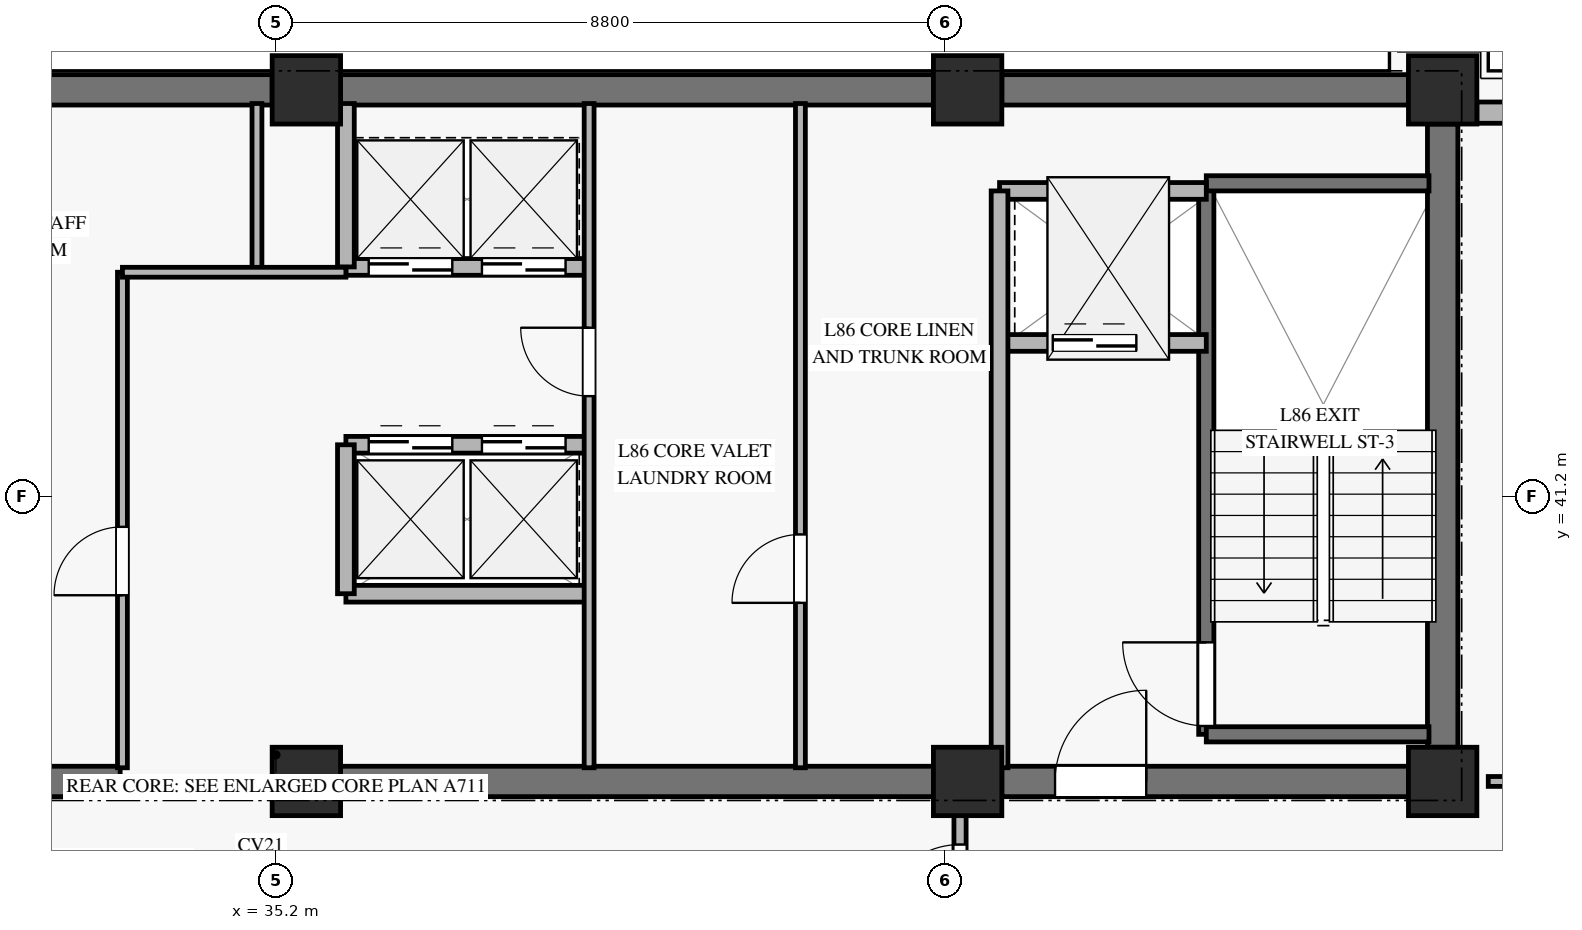
"""IFC4 building model, lengths in metres.
Left out: names, types, materials, properties, quantities, classifications, styles, units other than length and angle.
Written with IfcOpenShell. Run it as: python <this file> out.ifc"""

import sys

from ifc_helpers import new_model, si_unit, direction, frame, frame_2d, origin, origin_2d, place, context, subcontext, project, spatial, rectangle, extrude, source, transform, mapped, element, fill, save


model = new_model("IFC4")
c1 = context("Model", 3, precision=1e-05, world=origin(), true_north=direction((0.0, 1.0)))
c2 = subcontext(c1, "Body", "Model", "MODEL_VIEW")
j1 = project(units=[si_unit("LENGTHUNIT", "METRE"), si_unit("PLANEANGLEUNIT", "RADIAN")], contexts=[c1])
p1 = place(None, origin())
s1 = spatial("IfcSite", under=j1, at=p1, CompositionType="ELEMENT")
p2 = place(p1, origin())
s2 = spatial("IfcBuilding", under=s1, at=p2, CompositionType="ELEMENT")
p3 = place(p2, frame((0.0, 0.0, 332.3)))
s3 = spatial("IfcBuildingStorey", under=s2, at=p3, CompositionType="ELEMENT", Elevation=332.3)
m1 = source(origin(), c2, "Body", "SweptSolid", [
    extrude(rectangle(XDim=0.9, YDim=0.9, at=origin_2d()), origin(), (0.0, 0.0, 1.0), 3.185),
])
for number, where, z_axis, x_axis in (
    (1, (35.6, 37.45, 0.0), (0.0, 0.0, 1.0), (1.0, 0.0, 0.0)),
    (2, (35.6, 46.55, 0.0), (0.0, 0.0, 1.0), (1.0, 0.0, 0.0)),
    (3, (44.3, 37.45, 0.0), (0.0, 0.0, 1.0), (1.0, 0.0, 0.0)),
    (4, (44.3, 46.55, 0.0), (0.0, 0.0, 1.0), (1.0, 0.0, 0.0)),
    (5, (50.55, 37.45, 0.0), (0.0, 0.0, 1.0), (1.0, 0.0, 0.0)),
    (6, (50.55, 46.55, 0.0), (0.0, 0.0, 1.0), (1.0, 0.0, 0.0)),
):
    element("IfcColumn", number, at=place(p3, frame(where, z_axis=z_axis, x_axis=x_axis)), inside=s3, PredefinedType="PILASTER", context=c2, shape_type="MappedRepresentation", body=[
        mapped(m1, transform((0.0, 0.0, 0.0), x_axis=(1.0, 0.0, 0.0), y_axis=(0.0, 1.0, 0.0), z_axis=(0.0, 0.0, 1.0), scale=1.0)),
    ])
p4 = place(p3, frame((31.25, 46.55, 0.0), z_axis=(0.0, 0.0, 1.0), x_axis=(1.0, 0.0, 0.0)))
e7 = element("IfcWall", 7, at=p4, inside=s3, PredefinedType="SHEAR", context=c2, shape_type="SweptSolid", body=[
    extrude(rectangle(XDim=3.9, YDim=0.4, at=frame_2d((1.95, 0.0))), origin(), (0.0, 0.0, 1.0), 3.185),
])
p5 = place(p3, frame((36.05, 46.55, 0.0), z_axis=(0.0, 0.0, 1.0), x_axis=(1.0, 0.0, 0.0)))
e8 = element("IfcWall", 8, at=p5, inside=s3, PredefinedType="SHEAR", context=c2, shape_type="SweptSolid", body=[
    extrude(rectangle(XDim=7.8, YDim=0.4, at=frame_2d((3.9, 0.0))), origin(), (0.0, 0.0, 1.0), 3.185),
])
p6 = place(p3, frame((44.75, 46.55, 0.0), z_axis=(0.0, 0.0, 1.0), x_axis=(1.0, 0.0, 0.0)))
e9 = element("IfcWall", 9, at=p6, inside=s3, PredefinedType="SHEAR", context=c2, shape_type="SweptSolid", body=[
    extrude(rectangle(XDim=5.35, YDim=0.4, at=frame_2d((2.675, 0.0))), origin(), (0.0, 0.0, 1.0), 3.185),
])
p7 = place(p3, frame((31.25, 37.45, 0.0), z_axis=(0.0, 0.0, 1.0), x_axis=(1.0, 0.0, 0.0)))
e10 = element("IfcWall", 10, at=p7, inside=s3, PredefinedType="SHEAR", context=c2, shape_type="SweptSolid", body=[
    extrude(rectangle(XDim=1.9, YDim=0.4, at=frame_2d((0.95, 0.0))), origin(), (0.0, 0.0, 1.0), 3.185),
])
p8 = place(p3, frame((36.05, 37.45, 0.0), z_axis=(0.0, 0.0, 1.0), x_axis=(1.0, 0.0, 0.0)))
e11 = element("IfcWall", 11, at=p8, inside=s3, PredefinedType="SHEAR", context=c2, shape_type="SweptSolid", body=[
    extrude(rectangle(XDim=7.8, YDim=0.4, at=frame_2d((3.9, 0.0))), origin(), (0.0, 0.0, 1.0), 3.185),
])
p9 = place(p3, frame((44.75, 37.45, 0.0), z_axis=(0.0, 0.0, 1.0), x_axis=(1.0, 0.0, 0.0)))
e12 = element("IfcWall", 12, at=p9, inside=s3, PredefinedType="SHEAR", context=c2, shape_type="SweptSolid", body=[
    extrude(rectangle(XDim=5.35, YDim=0.4, at=frame_2d((2.675, 0.0))), origin(), (0.0, 0.0, 1.0), 3.185),
])
p10 = place(p9, frame((0.7, 0.0, 0.0)))
e13 = element("IfcOpeningElement", 13, at=p10, cuts=e12, PredefinedType="OPENING", context=c2, shape_type="SweptSolid", body=[
    extrude(rectangle(XDim=1.2, YDim=2.15, at=frame_2d((0.6, 1.075))), frame((0.0, 0.21, 0.0), z_axis=(0.0, -1.0, 0.0), x_axis=(1.0, 0.0, 0.0)), (0.0, 0.0, 1.0), 0.42),
])
p11 = place(p3, frame((50.55, 37.9, 0.0), z_axis=(0.0, 0.0, 1.0), x_axis=(0.0, 1.0, 0.0)))
e14 = element("IfcWall", 14, at=p11, inside=s3, PredefinedType="SHEAR", context=c2, shape_type="SweptSolid", body=[
    extrude(rectangle(XDim=8.2, YDim=0.4, at=frame_2d((4.1, 0.0))), origin(), (0.0, 0.0, 1.0), 3.185),
])
p12 = place(p3, frame((51.0, 46.25, 0.0), z_axis=(0.0, 0.0, 1.0), x_axis=(1.0, 0.0, 0.0)))
e15 = element("IfcWall", 15, at=p12, inside=s3, PredefinedType="SOLIDWALL", context=c2, shape_type="SweptSolid", body=[
    extrude(rectangle(XDim=5.639, YDim=0.28, at=frame_2d((2.819, 0.0))), origin(), (0.0, 0.0, 1.0), 2.815),
])
p13 = place(p12, frame((2.02, 0.0, 0.45)))
e16 = element("IfcOpeningElement", 16, at=p13, cuts=e15, PredefinedType="OPENING", context=c2, shape_type="SweptSolid", body=[
    extrude(rectangle(XDim=1.6, YDim=2.0, at=frame_2d((0.8, 1.0))), frame((0.0, 0.15, 0.0), z_axis=(0.0, -1.0, 0.0), x_axis=(1.0, 0.0, 0.0)), (0.0, 0.0, 1.0), 0.3),
])
p14 = place(p3, frame((47.44, 38.07, 0.0), z_axis=(0.0, 0.0, 1.0), x_axis=(0.0, 1.0, 0.0)))
e17 = element("IfcWall", 17, at=p14, inside=s3, PredefinedType="SOLIDWALL", context=c2, shape_type="SweptSolid", body=[
    extrude(rectangle(XDim=7.25, YDim=0.2, at=frame_2d((3.625, 0.0))), origin(), (0.0, 0.0, 1.0), 3.4),
])
p15 = place(p14, frame((0.11, 0.0, 0.0)))
e18 = element("IfcOpeningElement", 18, at=p15, cuts=e17, PredefinedType="OPENING", context=c2, shape_type="SweptSolid", body=[
    extrude(rectangle(XDim=1.1, YDim=2.15, at=frame_2d((0.55, 1.075))), frame((0.0, 0.11, 0.0), z_axis=(0.0, -1.0, 0.0), x_axis=(1.0, 0.0, 0.0)), (0.0, 0.0, 1.0), 0.22),
])
for number, where, z_axis, x_axis in (
    (19, (47.44, 45.32, 0.0), (0.0, 0.0, 1.0), (1.0, 0.0, 0.0)),
    (20, (47.44, 38.07, 0.0), (0.0, 0.0, 1.0), (1.0, 0.0, 0.0)),
):
    element("IfcWall", number, at=place(p3, frame(where, z_axis=z_axis, x_axis=x_axis)), inside=s3, PredefinedType="SOLIDWALL", context=c2, shape_type="SweptSolid", body=[
        extrude(rectangle(XDim=2.93, YDim=0.2, at=frame_2d((1.465, 0.0))), origin(), (0.0, 0.0, 1.0), 3.4),
    ])
p16 = place(p3, frame((44.72, 43.22, 0.0), z_axis=(0.0, 0.0, 1.0), x_axis=(1.0, 0.0, 0.0)))
e21 = element("IfcWall", 21, at=p16, inside=s3, PredefinedType="SOLIDWALL", context=c2, shape_type="SweptSolid", body=[
    extrude(rectangle(XDim=2.72, YDim=0.22, at=frame_2d((1.36, 0.0))), origin(), (0.0, 0.0, 1.0), 3.185),
])
p17 = place(p16, frame((0.7, 0.0, 0.0)))
e22 = element("IfcOpeningElement", 22, at=p17, cuts=e21, PredefinedType="OPENING", context=c2, shape_type="SweptSolid", body=[
    extrude(rectangle(XDim=1.1, YDim=2.2, at=frame_2d((0.55, 1.1))), frame((0.0, 0.12, 0.0), z_axis=(0.0, -1.0, 0.0), x_axis=(1.0, 0.0, 0.0)), (0.0, 0.0, 1.0), 0.24),
])
p18 = place(p3, frame((44.72, 45.22, 0.0), z_axis=(0.0, 0.0, 1.0), x_axis=(1.0, 0.0, 0.0)))
e23 = element("IfcWall", 23, at=p18, inside=s3, PredefinedType="SOLIDWALL", context=c2, shape_type="SweptSolid", body=[
    extrude(rectangle(XDim=2.72, YDim=0.22, at=frame_2d((1.36, 0.0))), origin(), (0.0, 0.0, 1.0), 3.185),
])
p19 = place(p3, frame((44.72, 37.63, 0.0), z_axis=(0.0, 0.0, 1.0), x_axis=(0.0, 1.0, 0.0)))
e24 = element("IfcWall", 24, at=p19, inside=s3, PredefinedType="SOLIDWALL", context=c2, shape_type="SweptSolid", body=[
    extrude(rectangle(XDim=7.59, YDim=0.22, at=frame_2d((3.795, 0.0))), origin(), (0.0, 0.0, 1.0), 3.185),
])
p20 = place(p3, frame((36.12, 44.22, 0.0), z_axis=(0.0, 0.0, 1.0), x_axis=(1.0, 0.0, 0.0)))
e25 = element("IfcWall", 25, at=p20, inside=s3, PredefinedType="SOLIDWALL", context=c2, shape_type="SweptSolid", body=[
    extrude(rectangle(XDim=3.2, YDim=0.22, at=frame_2d((1.6, 0.0))), origin(), (0.0, 0.0, 1.0), 3.185),
])
p21 = place(p20, frame((0.3, 0.0, 0.0)))
e26 = element("IfcOpeningElement", 26, at=p21, cuts=e25, PredefinedType="OPENING", context=c2, shape_type="SweptSolid", body=[
    extrude(rectangle(XDim=1.1, YDim=2.2, at=frame_2d((0.55, 1.1))), frame((0.0, 0.12, 0.0), z_axis=(0.0, -1.0, 0.0), x_axis=(1.0, 0.0, 0.0)), (0.0, 0.0, 1.0), 0.24),
])
p22 = place(p20, frame((1.79, 0.0, 0.0)))
e27 = element("IfcOpeningElement", 27, at=p22, cuts=e25, PredefinedType="OPENING", context=c2, shape_type="SweptSolid", body=[
    extrude(rectangle(XDim=1.1, YDim=2.2, at=frame_2d((0.55, 1.1))), frame((0.0, 0.12, 0.0), z_axis=(0.0, -1.0, 0.0), x_axis=(1.0, 0.0, 0.0)), (0.0, 0.0, 1.0), 0.24),
])
p23 = place(p3, frame((36.12, 41.88, 0.0), z_axis=(0.0, 0.0, 1.0), x_axis=(1.0, 0.0, 0.0)))
e28 = element("IfcWall", 28, at=p23, inside=s3, PredefinedType="SOLIDWALL", context=c2, shape_type="SweptSolid", body=[
    extrude(rectangle(XDim=3.2, YDim=0.22, at=frame_2d((1.6, 0.0))), origin(), (0.0, 0.0, 1.0), 3.185),
])
p24 = place(p23, frame((0.3, 0.0, 0.0)))
e29 = element("IfcOpeningElement", 29, at=p24, cuts=e28, PredefinedType="OPENING", context=c2, shape_type="SweptSolid", body=[
    extrude(rectangle(XDim=1.1, YDim=2.2, at=frame_2d((0.55, 1.1))), frame((0.0, 0.12, 0.0), z_axis=(0.0, -1.0, 0.0), x_axis=(1.0, 0.0, 0.0)), (0.0, 0.0, 1.0), 0.24),
])
p25 = place(p23, frame((1.79, 0.0, 0.0)))
e30 = element("IfcOpeningElement", 30, at=p25, cuts=e28, PredefinedType="OPENING", context=c2, shape_type="SweptSolid", body=[
    extrude(rectangle(XDim=1.1, YDim=2.2, at=frame_2d((0.55, 1.1))), frame((0.0, 0.12, 0.0), z_axis=(0.0, -1.0, 0.0), x_axis=(1.0, 0.0, 0.0)), (0.0, 0.0, 1.0), 0.24),
])
p26 = place(p3, frame((36.12, 39.92, 0.0), z_axis=(0.0, 0.0, 1.0), x_axis=(1.0, 0.0, 0.0)))
e31 = element("IfcWall", 31, at=p26, inside=s3, PredefinedType="SOLIDWALL", context=c2, shape_type="SweptSolid", body=[
    extrude(rectangle(XDim=3.2, YDim=0.22, at=frame_2d((1.6, 0.0))), origin(), (0.0, 0.0, 1.0), 3.185),
])
p27 = place(p3, frame((36.12, 39.92, 0.0), z_axis=(0.0, 0.0, 1.0), x_axis=(0.0, 1.0, 0.0)))
e32 = element("IfcWall", 32, at=p27, inside=s3, PredefinedType="SOLIDWALL", context=c2, shape_type="SweptSolid", body=[
    extrude(rectangle(XDim=1.96, YDim=0.22, at=frame_2d((0.98, 0.0))), origin(), (0.0, 0.0, 1.0), 3.185),
])
p28 = place(p3, frame((36.12, 44.22, 0.0), z_axis=(0.0, 0.0, 1.0), x_axis=(0.0, 1.0, 0.0)))
e33 = element("IfcWall", 33, at=p28, inside=s3, PredefinedType="SOLIDWALL", context=c2, shape_type="SweptSolid", body=[
    extrude(rectangle(XDim=2.15, YDim=0.22, at=frame_2d((1.075, 0.0))), origin(), (0.0, 0.0, 1.0), 3.185),
])
p29 = place(p3, frame((33.18, 37.63, 0.0), z_axis=(0.0, 0.0, 1.0), x_axis=(0.0, 1.0, 0.0)))
e34 = element("IfcWall", 34, at=p29, inside=s3, PredefinedType="PARTITIONING", context=c2, shape_type="SweptSolid", body=[
    extrude(rectangle(XDim=6.52, YDim=0.13, at=frame_2d((3.26, 0.0))), origin(), (0.0, 0.0, 1.0), 2.27),
])
p30 = place(p29, frame((2.27, 0.0, 0.0)))
e35 = element("IfcOpeningElement", 35, at=p30, cuts=e34, PredefinedType="OPENING", context=c2, shape_type="SweptSolid", body=[
    extrude(rectangle(XDim=0.9, YDim=2.1, at=frame_2d((0.45, 1.05))), frame((0.0, 0.075, 0.0), z_axis=(0.0, -1.0, 0.0), x_axis=(1.0, 0.0, 0.0)), (0.0, 0.0, 1.0), 0.15),
])
p31 = place(p3, frame((34.95, 44.15, 0.0), z_axis=(0.0, 0.0, 1.0), x_axis=(0.0, 1.0, 0.0)))
e36 = element("IfcWall", 36, at=p31, inside=s3, PredefinedType="PARTITIONING", context=c2, shape_type="SweptSolid", body=[
    extrude(rectangle(XDim=2.22, YDim=0.13, at=frame_2d((1.11, 0.0))), origin(), (0.0, 0.0, 1.0), 3.185),
])
p32 = place(p3, frame((33.18, 44.15, 0.0), z_axis=(0.0, 0.0, 1.0), x_axis=(1.0, 0.0, 0.0)))
e37 = element("IfcWall", 37, at=p32, inside=s3, PredefinedType="PARTITIONING", context=c2, shape_type="SweptSolid", body=[
    extrude(rectangle(XDim=2.94, YDim=0.13, at=frame_2d((1.47, 0.0))), origin(), (0.0, 0.0, 1.0), 2.47),
])
p33 = place(p3, frame((39.32, 37.63, 0.0), z_axis=(0.0, 0.0, 1.0), x_axis=(0.0, 1.0, 0.0)))
e38 = element("IfcWall", 38, at=p33, inside=s3, PredefinedType="PARTITIONING", context=c2, shape_type="SweptSolid", body=[
    extrude(rectangle(XDim=8.74, YDim=0.13, at=frame_2d((4.37, 0.0))), origin(), (0.0, 0.0, 1.0), 3.185),
])
p34 = place(p33, frame((4.89, 0.0, 0.0)))
e39 = element("IfcOpeningElement", 39, at=p34, cuts=e38, PredefinedType="OPENING", context=c2, shape_type="SweptSolid", body=[
    extrude(rectangle(XDim=0.9, YDim=2.1, at=frame_2d((0.45, 1.05))), frame((0.0, 0.075, 0.0), z_axis=(0.0, -1.0, 0.0), x_axis=(1.0, 0.0, 0.0)), (0.0, 0.0, 1.0), 0.15),
])
p35 = place(p3, frame((42.1, 37.63, 0.0), z_axis=(0.0, 0.0, 1.0), x_axis=(0.0, 1.0, 0.0)))
e40 = element("IfcWall", 40, at=p35, inside=s3, PredefinedType="PARTITIONING", context=c2, shape_type="SweptSolid", body=[
    extrude(rectangle(XDim=8.74, YDim=0.13, at=frame_2d((4.37, 0.0))), origin(), (0.0, 0.0, 1.0), 3.185),
])
p36 = place(p35, frame((2.17, 0.0, 0.0)))
e41 = element("IfcOpeningElement", 41, at=p36, cuts=e40, PredefinedType="OPENING", context=c2, shape_type="SweptSolid", body=[
    extrude(rectangle(XDim=0.9, YDim=2.1, at=frame_2d((0.45, 1.05))), frame((0.0, 0.075, 0.0), z_axis=(0.0, -1.0, 0.0), x_axis=(1.0, 0.0, 0.0)), (0.0, 0.0, 1.0), 0.15),
])
p37 = place(p3, frame((44.2, 21.636, 0.0), z_axis=(0.0, 0.0, 1.0), x_axis=(0.0, 1.0, 0.0)))
e42 = element("IfcWall", 42, at=p37, inside=s3, PredefinedType="PARTITIONING", context=c2, shape_type="SweptSolid", body=[
    extrude(rectangle(XDim=15.814, YDim=0.16, at=frame_2d((7.907, 0.0))), origin(), (0.0, 0.0, 1.0), 2.47),
])
p38 = place(p37, frame((13.934, 0.0, 0.0)))
e43 = element("IfcOpeningElement", 43, at=p38, cuts=e42, PredefinedType="OPENING", context=c2, shape_type="SweptSolid", body=[
    extrude(rectangle(XDim=1.05, YDim=2.15, at=frame_2d((0.525, 1.075))), frame((0.0, 0.09, 0.0), z_axis=(0.0, -1.0, 0.0), x_axis=(1.0, 0.0, 0.0)), (0.0, 0.0, 1.0), 0.18),
])
p39 = place(p3, frame((51.15, 37.45, 0.0), z_axis=(0.0, 0.0, 1.0), x_axis=(1.0, 0.0, 0.0)))
e44 = element("IfcWall", 44, at=p39, inside=s3, PredefinedType="PARTITIONING", context=c2, shape_type="SweptSolid", body=[
    extrude(rectangle(XDim=7.981, YDim=0.13, at=frame_2d((3.991, 0.0))), origin(), (0.0, 0.0, 1.0), 2.82),
])
p40 = place(p39, frame((0.5, 0.0, 0.0)))
e45 = element("IfcOpeningElement", 45, at=p40, cuts=e44, PredefinedType="OPENING", context=c2, shape_type="SweptSolid", body=[
    extrude(rectangle(XDim=0.9, YDim=2.1, at=frame_2d((0.45, 1.05))), frame((0.0, 0.075, 0.0), z_axis=(0.0, -1.0, 0.0), x_axis=(1.0, 0.0, 0.0)), (0.0, 0.0, 1.0), 0.15),
])
p41 = place(p39, frame((5.735, 0.0, 0.0)))
e46 = element("IfcOpeningElement", 46, at=p41, cuts=e44, PredefinedType="OPENING", context=c2, shape_type="SweptSolid", body=[
    extrude(rectangle(XDim=0.95, YDim=2.1, at=frame_2d((0.475, 1.05))), frame((0.0, 0.075, 0.0), z_axis=(0.0, -1.0, 0.0), x_axis=(1.0, 0.0, 0.0)), (0.0, 0.0, 1.0), 0.15),
])
m2 = source(origin(), c2, "Body", "SweptSolid", [
    extrude(rectangle(XDim=1.1, YDim=2.15, at=frame_2d((0.55, 1.075))), frame((0.0, 0.025, 0.0), z_axis=(0.0, -1.0, 0.0), x_axis=(1.0, 0.0, 0.0)), (0.0, 0.0, 1.0), 0.05),
])
p42 = place(p15, origin())
e47 = element("IfcDoor", 47, at=p42, inside=s3, OperationType="SINGLE_SWING_RIGHT", PredefinedType="DOOR", context=c2, shape_type="MappedRepresentation", body=[
    mapped(m2, transform((0.0, 0.0, 0.0), x_axis=(1.0, 0.0, 0.0), y_axis=(0.0, 1.0, 0.0), z_axis=(0.0, 0.0, 1.0), scale=1.0)),
])
fill(e18, e47)
m3 = source(origin(), c2, "Body", "SweptSolid", [
    extrude(rectangle(XDim=1.1, YDim=2.2, at=frame_2d((0.55, 1.1))), frame((0.0, 0.025, 0.0), z_axis=(0.0, -1.0, 0.0), x_axis=(1.0, 0.0, 0.0)), (0.0, 0.0, 1.0), 0.05),
])
p43 = place(p17, origin())
e48 = element("IfcDoor", 48, at=p43, inside=s3, OperationType="SLIDING_TO_LEFT", PredefinedType="DOOR", context=c2, shape_type="MappedRepresentation", body=[
    mapped(m3, transform((0.0, 0.0, 0.0), x_axis=(1.0, 0.0, 0.0), y_axis=(0.0, 1.0, 0.0), z_axis=(0.0, 0.0, 1.0), scale=1.0)),
])
fill(e22, e48)
m4 = source(origin(), c2, "Body", "SweptSolid", [
    extrude(rectangle(XDim=1.2, YDim=2.15, at=frame_2d((0.6, 1.075))), frame((0.0, 0.025, 0.0), z_axis=(0.0, -1.0, 0.0), x_axis=(1.0, 0.0, 0.0)), (0.0, 0.0, 1.0), 0.05),
])
p44 = place(p10, origin())
e49 = element("IfcDoor", 49, at=p44, inside=s3, OperationType="SINGLE_SWING_RIGHT", PredefinedType="DOOR", context=c2, shape_type="MappedRepresentation", body=[
    mapped(m4, transform((0.0, 0.0, 0.0), x_axis=(1.0, 0.0, 0.0), y_axis=(0.0, 1.0, 0.0), z_axis=(0.0, 0.0, 1.0), scale=1.0)),
])
fill(e13, e49)
p45 = place(p21, origin())
e50 = element("IfcDoor", 50, at=p45, inside=s3, OperationType="SLIDING_TO_LEFT", PredefinedType="DOOR", context=c2, shape_type="MappedRepresentation", body=[
    mapped(m3, transform((0.0, 0.0, 0.0), x_axis=(1.0, 0.0, 0.0), y_axis=(0.0, 1.0, 0.0), z_axis=(0.0, 0.0, 1.0), scale=1.0)),
])
fill(e26, e50)
p46 = place(p22, origin())
e51 = element("IfcDoor", 51, at=p46, inside=s3, OperationType="SLIDING_TO_LEFT", PredefinedType="DOOR", context=c2, shape_type="MappedRepresentation", body=[
    mapped(m3, transform((0.0, 0.0, 0.0), x_axis=(1.0, 0.0, 0.0), y_axis=(0.0, 1.0, 0.0), z_axis=(0.0, 0.0, 1.0), scale=1.0)),
])
fill(e27, e51)
p47 = place(p24, origin())
e52 = element("IfcDoor", 52, at=p47, inside=s3, OperationType="SLIDING_TO_LEFT", PredefinedType="DOOR", context=c2, shape_type="MappedRepresentation", body=[
    mapped(m3, transform((0.0, 0.0, 0.0), x_axis=(1.0, 0.0, 0.0), y_axis=(0.0, 1.0, 0.0), z_axis=(0.0, 0.0, 1.0), scale=1.0)),
])
fill(e29, e52)
p48 = place(p25, origin())
e53 = element("IfcDoor", 53, at=p48, inside=s3, OperationType="SLIDING_TO_LEFT", PredefinedType="DOOR", context=c2, shape_type="MappedRepresentation", body=[
    mapped(m3, transform((0.0, 0.0, 0.0), x_axis=(1.0, 0.0, 0.0), y_axis=(0.0, 1.0, 0.0), z_axis=(0.0, 0.0, 1.0), scale=1.0)),
])
fill(e30, e53)
m5 = source(origin(), c2, "Body", "SweptSolid", [
    extrude(rectangle(XDim=0.9, YDim=2.1, at=frame_2d((0.45, 1.05))), frame((0.0, 0.025, 0.0), z_axis=(0.0, -1.0, 0.0), x_axis=(1.0, 0.0, 0.0)), (0.0, 0.0, 1.0), 0.05),
])
p49 = place(p30, origin())
e54 = element("IfcDoor", 54, at=p49, inside=s3, OperationType="SINGLE_SWING_LEFT", PredefinedType="DOOR", context=c2, shape_type="MappedRepresentation", body=[
    mapped(m5, transform((0.0, 0.0, 0.0), x_axis=(1.0, 0.0, 0.0), y_axis=(0.0, 1.0, 0.0), z_axis=(0.0, 0.0, 1.0), scale=1.0)),
])
fill(e35, e54)
p50 = place(p34, origin())
e55 = element("IfcDoor", 55, at=p50, inside=s3, OperationType="SINGLE_SWING_RIGHT", PredefinedType="DOOR", context=c2, shape_type="MappedRepresentation", body=[
    mapped(m5, transform((0.0, 0.0, 0.0), x_axis=(1.0, 0.0, 0.0), y_axis=(0.0, 1.0, 0.0), z_axis=(0.0, 0.0, 1.0), scale=1.0)),
])
fill(e39, e55)
p51 = place(p36, origin())
e56 = element("IfcDoor", 56, at=p51, inside=s3, OperationType="SINGLE_SWING_LEFT", PredefinedType="DOOR", context=c2, shape_type="MappedRepresentation", body=[
    mapped(m5, transform((0.0, 0.0, 0.0), x_axis=(1.0, 0.0, 0.0), y_axis=(0.0, 1.0, 0.0), z_axis=(0.0, 0.0, 1.0), scale=1.0)),
])
fill(e41, e56)
m6 = source(origin(), c2, "Body", "SweptSolid", [
    extrude(rectangle(XDim=1.05, YDim=2.15, at=frame_2d((0.525, 1.075))), frame((0.0, 0.025, 0.0), z_axis=(0.0, -1.0, 0.0), x_axis=(1.0, 0.0, 0.0)), (0.0, 0.0, 1.0), 0.05),
])
p52 = place(p38, origin())
e57 = element("IfcDoor", 57, at=p52, inside=s3, OperationType="SINGLE_SWING_LEFT", PredefinedType="DOOR", context=c2, shape_type="MappedRepresentation", body=[
    mapped(m6, transform((0.0, 0.0, 0.0), x_axis=(1.0, 0.0, 0.0), y_axis=(0.0, 1.0, 0.0), z_axis=(0.0, 0.0, 1.0), scale=1.0)),
])
fill(e43, e57)
save(model, sys.argv[1])
